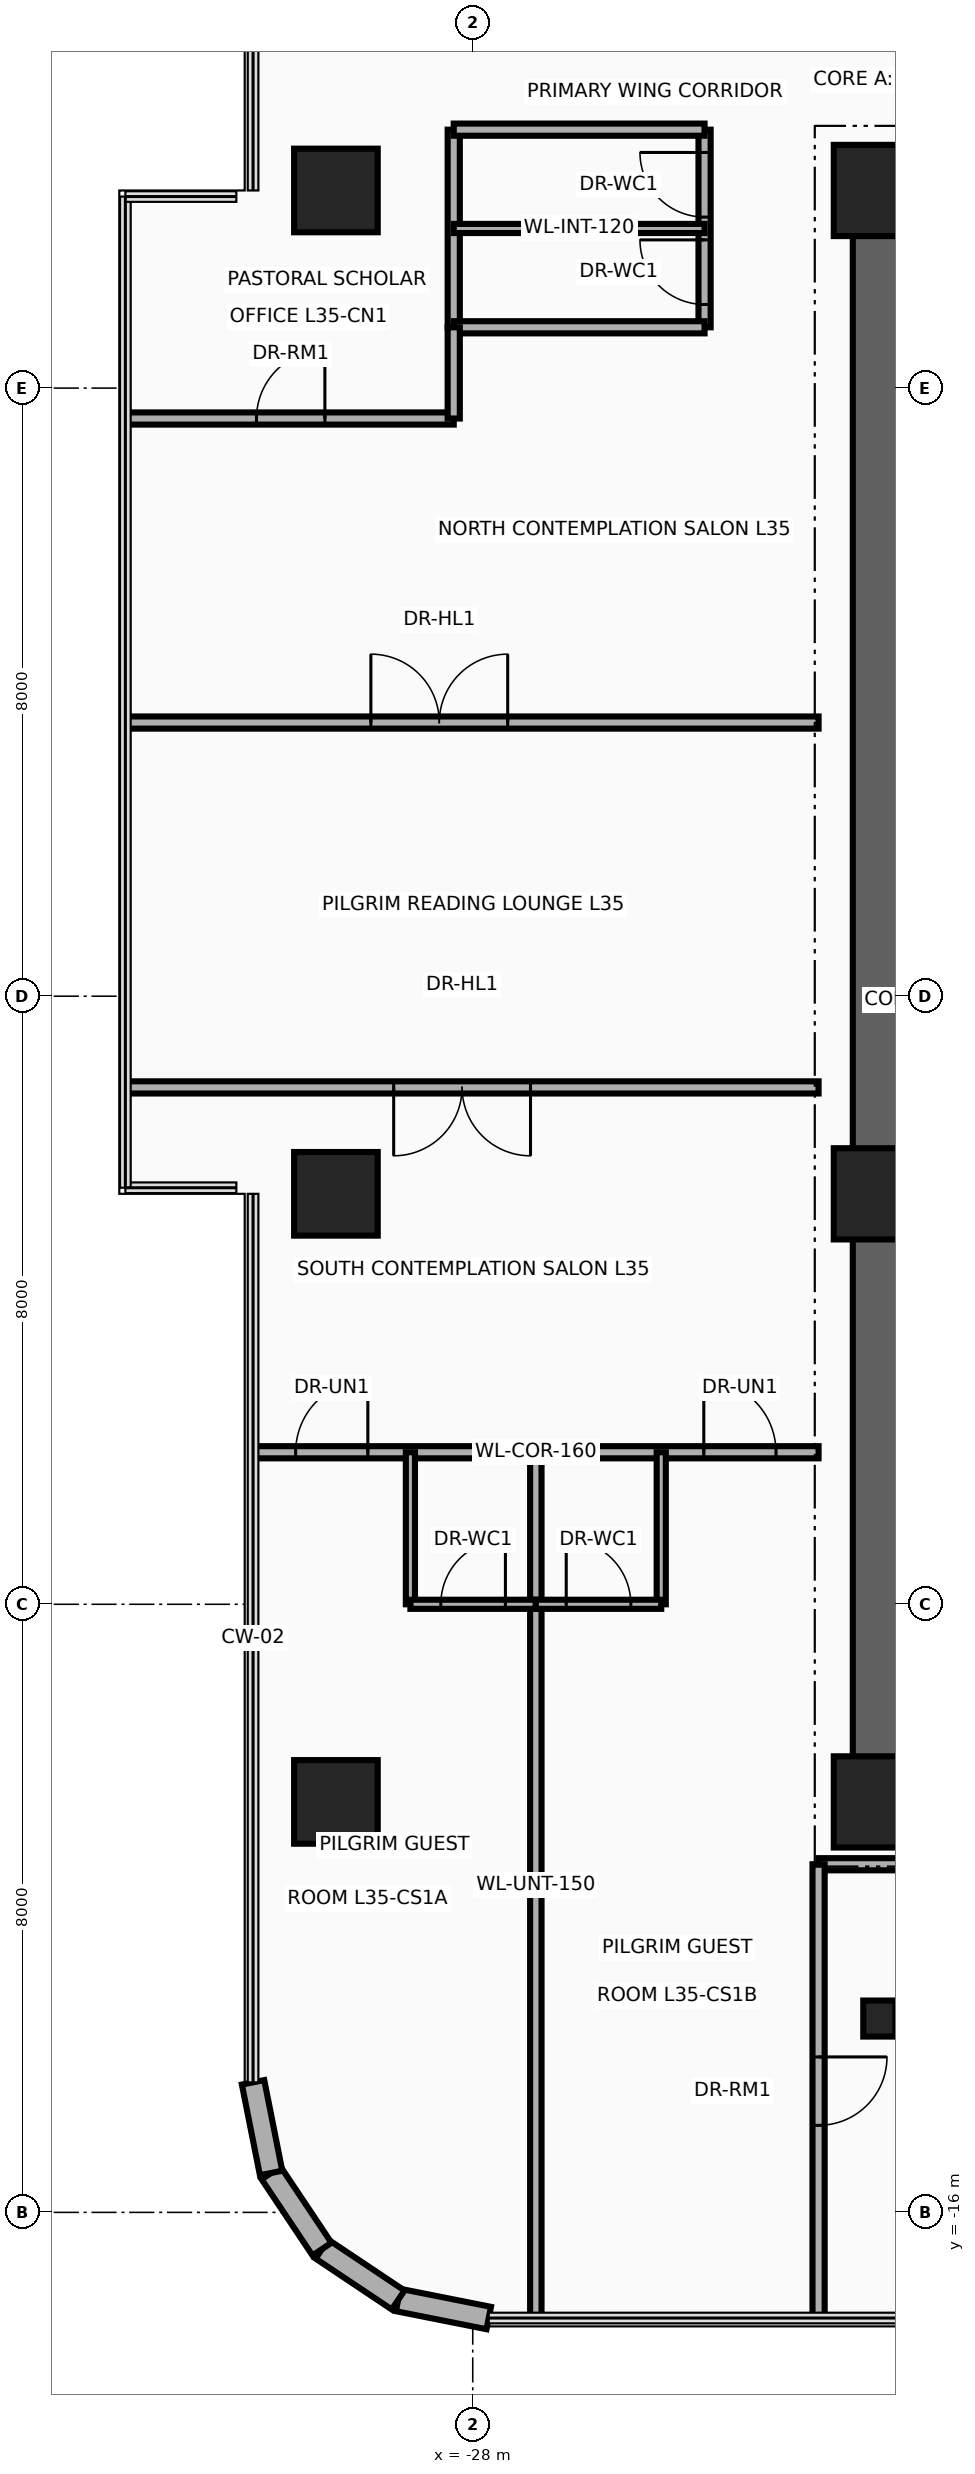
"""IFC4 building model, lengths in metres.
Left out: names, types, materials, properties, quantities, classifications, styles, units other than length and angle.
Written with IfcOpenShell. Run it as: python <this file> out.ifc"""

import sys

from ifc_helpers import new_model, si_unit, direction, frame, frame_2d, origin, origin_2d, place, context, subcontext, project, spatial, rectangle, circle, i_section, extrude, source, transform, mapped, element, fill, save


model = new_model("IFC4")
c1 = context("Model", 3, precision=1e-05, world=origin(), true_north=direction((0.0, 1.0)))
c2 = subcontext(c1, "Body", "Model", "MODEL_VIEW")
j1 = project(units=[si_unit("LENGTHUNIT", "METRE"), si_unit("PLANEANGLEUNIT", "RADIAN")], contexts=[c1])
p1 = place(None, origin())
s1 = spatial("IfcSite", under=j1, at=p1, CompositionType="ELEMENT")
p2 = place(p1, origin())
s2 = spatial("IfcBuilding", under=s1, at=p2, CompositionType="ELEMENT")
p3 = place(p2, frame((0.0, 0.0, 139.0)))
s3 = spatial("IfcBuildingStorey", under=s2, at=p3, CompositionType="ELEMENT", Elevation=139.0)
p4 = place(p3, frame((-22.65, -11.15, 0.0), z_axis=(0.0, 0.0, 1.0), x_axis=(0.0, 1.0, 0.0)))
e1 = element("IfcWall", 1, at=p4, inside=s3, PredefinedType="SHEAR", context=c2, shape_type="SweptSolid", body=[
    extrude(rectangle(XDim=22.3, YDim=0.7, at=frame_2d((11.15, 0.0))), origin(), (0.0, 0.0, 1.0), 3.46),
])
for number, where, z_axis, x_axis in (
    (2, (-22.65, 10.8, 0.0), (0.0, 0.0, 1.0), (1.0, 0.0, 0.0)),
    (3, (-22.65, -10.8, 0.0), (0.0, 0.0, 1.0), (1.0, 0.0, 0.0)),
):
    element("IfcWall", number, at=place(p3, frame(where, z_axis=z_axis, x_axis=x_axis)), inside=s3, PredefinedType="SHEAR", context=c2, shape_type="SweptSolid", body=[
        extrude(rectangle(XDim=10.25, YDim=0.7, at=frame_2d((5.125, 0.0))), origin(), (0.0, 0.0, 1.0), 3.46),
    ])
m1 = source(origin(), c2, "Body", "SweptSolid", [
    extrude(circle(Radius=0.55, at=origin_2d()), origin(), (0.0, 0.0, 1.0), 3.7),
])
p5 = place(p3, frame((-29.8, -10.6, 0.0), z_axis=(0.0, 0.0, 1.0), x_axis=(1.0, 0.0, 0.0)))
e4 = element("IfcColumn", 4, at=p5, inside=s3, PredefinedType="COLUMN", context=c2, shape_type="MappedRepresentation", body=[
    mapped(m1, transform((0.0, 0.0, 0.0), x_axis=(1.0, 0.0, 0.0), y_axis=(0.0, 1.0, 0.0), z_axis=(0.0, 0.0, 1.0), scale=1.0)),
])
m2 = source(origin(), c2, "Body", "SweptSolid", [
    extrude(rectangle(XDim=1.2, YDim=1.2, at=origin_2d()), origin(), (0.0, 0.0, 1.0), 3.7),
])
p6 = place(p3, frame((-22.65, -10.6, 0.0), z_axis=(0.0, 0.0, 1.0), x_axis=(1.0, 0.0, 0.0)))
e5 = element("IfcColumn", 5, at=p6, inside=s3, PredefinedType="COLUMN", context=c2, shape_type="MappedRepresentation", body=[
    mapped(m2, transform((0.0, 0.0, 0.0), x_axis=(1.0, 0.0, 0.0), y_axis=(0.0, 1.0, 0.0), z_axis=(0.0, 0.0, 1.0), scale=1.0)),
])
p7 = place(p3, frame((-29.8, -2.6, 0.0), z_axis=(0.0, 0.0, 1.0), x_axis=(1.0, 0.0, 0.0)))
e6 = element("IfcColumn", 6, at=p7, inside=s3, PredefinedType="COLUMN", context=c2, shape_type="MappedRepresentation", body=[
    mapped(m1, transform((0.0, 0.0, 0.0), x_axis=(1.0, 0.0, 0.0), y_axis=(0.0, 1.0, 0.0), z_axis=(0.0, 0.0, 1.0), scale=1.0)),
])
p8 = place(p3, frame((-22.65, -2.6, 0.0), z_axis=(0.0, 0.0, 1.0), x_axis=(1.0, 0.0, 0.0)))
e7 = element("IfcColumn", 7, at=p8, inside=s3, PredefinedType="COLUMN", context=c2, shape_type="MappedRepresentation", body=[
    mapped(m2, transform((0.0, 0.0, 0.0), x_axis=(1.0, 0.0, 0.0), y_axis=(0.0, 1.0, 0.0), z_axis=(0.0, 0.0, 1.0), scale=1.0)),
])
p9 = place(p3, frame((-29.8, 10.6, 0.0), z_axis=(0.0, 0.0, 1.0), x_axis=(1.0, 0.0, 0.0)))
e8 = element("IfcColumn", 8, at=p9, inside=s3, PredefinedType="COLUMN", context=c2, shape_type="MappedRepresentation", body=[
    mapped(m1, transform((0.0, 0.0, 0.0), x_axis=(1.0, 0.0, 0.0), y_axis=(0.0, 1.0, 0.0), z_axis=(0.0, 0.0, 1.0), scale=1.0)),
])
p10 = place(p3, frame((-22.65, 10.6, 0.0), z_axis=(0.0, 0.0, 1.0), x_axis=(1.0, 0.0, 0.0)))
e9 = element("IfcColumn", 9, at=p10, inside=s3, PredefinedType="COLUMN", context=c2, shape_type="MappedRepresentation", body=[
    mapped(m2, transform((0.0, 0.0, 0.0), x_axis=(1.0, 0.0, 0.0), y_axis=(0.0, 1.0, 0.0), z_axis=(0.0, 0.0, 1.0), scale=1.0)),
])
m3 = source(origin(), c2, "Body", "SweptSolid", [
    extrude(i_section(OverallWidth=0.424, OverallDepth=0.474, WebThickness=0.048, FlangeThickness=0.077, at=origin_2d()), origin(), (0.0, 0.0, 1.0), 3.7),
])
p11 = place(p3, frame((-22.65, -13.45, 0.0), z_axis=(0.0, 0.0, 1.0), x_axis=(1.0, 0.0, 0.0)))
e10 = element("IfcColumn", 10, at=p11, inside=s3, PredefinedType="COLUMN", context=c2, shape_type="MappedRepresentation", body=[
    mapped(m3, transform((0.0, 0.0, 0.0), x_axis=(1.0, 0.0, 0.0), y_axis=(0.0, 1.0, 0.0), z_axis=(0.0, 0.0, 1.0), scale=1.0)),
])
p12 = place(p3, frame((-27.789, -17.39, 0.0), z_axis=(0.0, 0.0, 1.0), x_axis=(-0.980804027463, 0.194996050505, 0.0)))
e11 = element("IfcWall", 11, at=p12, inside=s3, PredefinedType="SOLIDWALL", context=c2, shape_type="SweptSolid", body=[
    extrude(rectangle(XDim=1.216, YDim=0.3, at=frame_2d((0.608, 0.0))), origin(), (0.0, 0.0, 1.0), 3.46),
])
for number, where, z_axis, x_axis in (
    (12, (-28.982, -17.153, 0.0), (0.0, 0.0, 1.0), (-0.831, 0.556, 0.0)),
    (13, (-29.983, -16.483, 0.0), (0.0, 0.0, 1.0), (-0.556, 0.831, 0.0)),
):
    element("IfcWall", number, at=place(p3, frame(where, z_axis=z_axis, x_axis=x_axis)), inside=s3, PredefinedType="SOLIDWALL", context=c2, shape_type="SweptSolid", body=[
        extrude(rectangle(XDim=1.205, YDim=0.3, at=frame_2d((0.603, 0.0))), origin(), (0.0, 0.0, 1.0), 3.46),
    ])
p13 = place(p3, frame((-30.653, -15.482, 0.0), z_axis=(0.0, 0.0, 1.0), x_axis=(-0.194996050505, 0.980804027463, 0.0)))
e14 = element("IfcWall", 14, at=p13, inside=s3, PredefinedType="SOLIDWALL", context=c2, shape_type="SweptSolid", body=[
    extrude(rectangle(XDim=1.216, YDim=0.3, at=frame_2d((0.608, 0.0))), origin(), (0.0, 0.0, 1.0), 3.46),
])
p14 = place(p3, frame((-28.25, 8.8, 0.0), z_axis=(0.0, 0.0, 1.0), x_axis=(0.0, 1.0, 0.0)))
e15 = element("IfcWall", 15, at=p14, inside=s3, PredefinedType="PARTITIONING", context=c2, shape_type="SweptSolid", body=[
    extrude(rectangle(XDim=2.6, YDim=0.16, at=frame_2d((1.3, 0.0))), origin(), (0.0, 0.0, 1.0), 2.666),
])
p15 = place(p3, frame((-24.95, 8.8, 0.0), z_axis=(0.0, 0.0, 1.0), x_axis=(0.0, 1.0, 0.0)))
e16 = element("IfcWall", 16, at=p15, inside=s3, PredefinedType="PARTITIONING", context=c2, shape_type="SweptSolid", body=[
    extrude(rectangle(XDim=2.6, YDim=0.16, at=frame_2d((1.3, 0.0))), origin(), (0.0, 0.0, 1.0), 2.666),
])
p16 = place(p15, frame((0.3, 0.0, 0.0)))
e17 = element("IfcOpeningElement", 17, at=p16, cuts=e16, PredefinedType="OPENING", context=c2, shape_type="SweptSolid", body=[
    extrude(rectangle(XDim=0.85, YDim=2.1, at=frame_2d((0.425, 1.05))), frame((0.0, 0.095, 0.0), z_axis=(0.0, -1.0, 0.0), x_axis=(1.0, 0.0, 0.0)), (0.0, 0.0, 1.0), 0.19),
])
p17 = place(p15, frame((1.45, 0.0, 0.0)))
e18 = element("IfcOpeningElement", 18, at=p17, cuts=e16, PredefinedType="OPENING", context=c2, shape_type="SweptSolid", body=[
    extrude(rectangle(XDim=0.85, YDim=2.1, at=frame_2d((0.425, 1.05))), frame((0.0, 0.095, 0.0), z_axis=(0.0, -1.0, 0.0), x_axis=(1.0, 0.0, 0.0)), (0.0, 0.0, 1.0), 0.19),
])
for number, where, z_axis, x_axis in (
    (19, (-28.25, 8.8, 0.0), (0.0, 0.0, 1.0), (1.0, 0.0, 0.0)),
    (20, (-28.25, 11.4, 0.0), (0.0, 0.0, 1.0), (1.0, 0.0, 0.0)),
):
    element("IfcWall", number, at=place(p3, frame(where, z_axis=z_axis, x_axis=x_axis)), inside=s3, PredefinedType="PARTITIONING", context=c2, shape_type="SweptSolid", body=[
        extrude(rectangle(XDim=3.3, YDim=0.16, at=frame_2d((1.65, 0.0))), origin(), (0.0, 0.0, 1.0), 3.46),
    ])
p18 = place(p3, frame((-28.25, 10.1, 0.0), z_axis=(0.0, 0.0, 1.0), x_axis=(1.0, 0.0, 0.0)))
e21 = element("IfcWall", 21, at=p18, inside=s3, PredefinedType="PARTITIONING", context=c2, shape_type="SweptSolid", body=[
    extrude(rectangle(XDim=3.3, YDim=0.12, at=frame_2d((1.65, 0.0))), origin(), (0.0, 0.0, 1.0), 3.46),
])
p19 = place(p3, frame((-23.45, -11.42, 0.0), z_axis=(0.0, 0.0, 1.0), x_axis=(1.0, 0.0, 0.0)))
e22 = element("IfcWall", 22, at=p19, inside=s3, PredefinedType="PARTITIONING", context=c2, shape_type="SweptSolid", body=[
    extrude(rectangle(XDim=13.84, YDim=0.16, at=frame_2d((6.92, 0.0))), origin(), (0.0, 0.0, 1.0), 2.834),
])
p20 = place(p3, frame((-23.45, -17.39, 0.0), z_axis=(0.0, 0.0, 1.0), x_axis=(0.0, 1.0, 0.0)))
e23 = element("IfcWall", 23, at=p20, inside=s3, PredefinedType="PARTITIONING", context=c2, shape_type="SweptSolid", body=[
    extrude(rectangle(XDim=5.97, YDim=0.16, at=frame_2d((2.985, 0.0))), origin(), (0.0, 0.0, 1.0), 3.46),
])
p21 = place(p20, frame((2.535, 0.0, 0.0)))
e24 = element("IfcOpeningElement", 24, at=p21, cuts=e23, PredefinedType="OPENING", context=c2, shape_type="SweptSolid", body=[
    extrude(rectangle(XDim=0.9, YDim=2.1, at=frame_2d((0.45, 1.05))), frame((0.0, 0.095, 0.0), z_axis=(0.0, -1.0, 0.0), x_axis=(1.0, 0.0, 0.0)), (0.0, 0.0, 1.0), 0.19),
])
p22 = place(p3, frame((-30.89, -6.0, 0.0), z_axis=(0.0, 0.0, 1.0), x_axis=(1.0, 0.0, 0.0)))
e25 = element("IfcWall", 25, at=p22, inside=s3, PredefinedType="PARTITIONING", context=c2, shape_type="SweptSolid", body=[
    extrude(rectangle(XDim=7.44, YDim=0.16, at=frame_2d((3.72, 0.0))), origin(), (0.0, 0.0, 1.0), 2.896),
])
p23 = place(p22, frame((0.56, 0.0, 0.0)))
e26 = element("IfcOpeningElement", 26, at=p23, cuts=e25, PredefinedType="OPENING", context=c2, shape_type="SweptSolid", body=[
    extrude(rectangle(XDim=0.95, YDim=2.15, at=frame_2d((0.475, 1.075))), frame((0.0, 0.095, 0.0), z_axis=(0.0, -1.0, 0.0), x_axis=(1.0, 0.0, 0.0)), (0.0, 0.0, 1.0), 0.19),
])
p24 = place(p22, frame((5.93, 0.0, 0.0)))
e27 = element("IfcOpeningElement", 27, at=p24, cuts=e25, PredefinedType="OPENING", context=c2, shape_type="SweptSolid", body=[
    extrude(rectangle(XDim=0.95, YDim=2.15, at=frame_2d((0.475, 1.075))), frame((0.0, 0.095, 0.0), z_axis=(0.0, -1.0, 0.0), x_axis=(1.0, 0.0, 0.0)), (0.0, 0.0, 1.0), 0.19),
])
p25 = place(p3, frame((-32.54, 7.6, 0.0), z_axis=(0.0, 0.0, 1.0), x_axis=(1.0, 0.0, 0.0)))
e28 = element("IfcWall", 28, at=p25, inside=s3, PredefinedType="PARTITIONING", context=c2, shape_type="SweptSolid", body=[
    extrude(rectangle(XDim=4.29, YDim=0.16, at=frame_2d((2.145, 0.0))), origin(), (0.0, 0.0, 1.0), 2.896),
])
p26 = place(p25, frame((1.695, 0.0, 0.0)))
e29 = element("IfcOpeningElement", 29, at=p26, cuts=e28, PredefinedType="OPENING", context=c2, shape_type="SweptSolid", body=[
    extrude(rectangle(XDim=0.9, YDim=2.1, at=frame_2d((0.45, 1.05))), frame((0.0, 0.095, 0.0), z_axis=(0.0, -1.0, 0.0), x_axis=(1.0, 0.0, 0.0)), (0.0, 0.0, 1.0), 0.19),
])
p27 = place(p3, frame((-28.25, 7.6, 0.0), z_axis=(0.0, 0.0, 1.0), x_axis=(0.0, 1.0, 0.0)))
e30 = element("IfcWall", 30, at=p27, inside=s3, PredefinedType="PARTITIONING", context=c2, shape_type="SweptSolid", body=[
    extrude(rectangle(XDim=1.2, YDim=0.16, at=frame_2d((0.6, 0.0))), origin(), (0.0, 0.0, 1.0), 2.988),
])
p28 = place(p3, frame((-27.17, -17.39, 0.0), z_axis=(0.0, 0.0, 1.0), x_axis=(0.0, 1.0, 0.0)))
e31 = element("IfcWall", 31, at=p28, inside=s3, PredefinedType="PARTITIONING", context=c2, shape_type="SweptSolid", body=[
    extrude(rectangle(XDim=11.39, YDim=0.15, at=frame_2d((5.695, 0.0))), origin(), (0.0, 0.0, 1.0), 2.666),
])
p29 = place(p3, frame((-28.82, -8.0, 0.0), z_axis=(0.0, 0.0, 1.0), x_axis=(0.0, 1.0, 0.0)))
e32 = element("IfcWall", 32, at=p29, inside=s3, PredefinedType="PARTITIONING", context=c2, shape_type="SweptSolid", body=[
    extrude(rectangle(XDim=2.0, YDim=0.12, at=frame_2d((1.0, 0.0))), origin(), (0.0, 0.0, 1.0), 2.988),
])
p30 = place(p3, frame((-28.82, -8.0, 0.0), z_axis=(0.0, 0.0, 1.0), x_axis=(1.0, 0.0, 0.0)))
e33 = element("IfcWall", 33, at=p30, inside=s3, PredefinedType="PARTITIONING", context=c2, shape_type="SweptSolid", body=[
    extrude(rectangle(XDim=1.65, YDim=0.12, at=frame_2d((0.825, 0.0))), origin(), (0.0, 0.0, 1.0), 3.46),
])
p31 = place(p30, frame((0.4, 0.0, 0.0)))
e34 = element("IfcOpeningElement", 34, at=p31, cuts=e33, PredefinedType="OPENING", context=c2, shape_type="SweptSolid", body=[
    extrude(rectangle(XDim=0.85, YDim=2.1, at=frame_2d((0.425, 1.05))), frame((0.0, 0.075, 0.0), z_axis=(0.0, -1.0, 0.0), x_axis=(1.0, 0.0, 0.0)), (0.0, 0.0, 1.0), 0.15),
])
p32 = place(p3, frame((-25.52, -8.0, 0.0), z_axis=(0.0, 0.0, 1.0), x_axis=(0.0, 1.0, 0.0)))
e35 = element("IfcWall", 35, at=p32, inside=s3, PredefinedType="PARTITIONING", context=c2, shape_type="SweptSolid", body=[
    extrude(rectangle(XDim=2.0, YDim=0.12, at=frame_2d((1.0, 0.0))), origin(), (0.0, 0.0, 1.0), 2.988),
])
p33 = place(p3, frame((-27.17, -8.0, 0.0), z_axis=(0.0, 0.0, 1.0), x_axis=(1.0, 0.0, 0.0)))
e36 = element("IfcWall", 36, at=p33, inside=s3, PredefinedType="PARTITIONING", context=c2, shape_type="SweptSolid", body=[
    extrude(rectangle(XDim=1.65, YDim=0.12, at=frame_2d((0.825, 0.0))), origin(), (0.0, 0.0, 1.0), 3.46),
])
p34 = place(p33, frame((0.4, 0.0, 0.0)))
e37 = element("IfcOpeningElement", 37, at=p34, cuts=e36, PredefinedType="OPENING", context=c2, shape_type="SweptSolid", body=[
    extrude(rectangle(XDim=0.85, YDim=2.1, at=frame_2d((0.425, 1.05))), frame((0.0, 0.075, 0.0), z_axis=(0.0, -1.0, 0.0), x_axis=(1.0, 0.0, 0.0)), (0.0, 0.0, 1.0), 0.15),
])
p35 = place(p3, frame((-32.54, -1.2, 0.0), z_axis=(0.0, 0.0, 1.0), x_axis=(1.0, 0.0, 0.0)))
e38 = element("IfcWall", 38, at=p35, inside=s3, PredefinedType="PARTITIONING", context=c2, shape_type="SweptSolid", body=[
    extrude(rectangle(XDim=9.09, YDim=0.16, at=frame_2d((4.545, 0.0))), origin(), (0.0, 0.0, 1.0), 2.896),
])
p36 = place(p35, frame((3.5, 0.0, 0.0)))
e39 = element("IfcOpeningElement", 39, at=p36, cuts=e38, PredefinedType="OPENING", context=c2, shape_type="SweptSolid", body=[
    extrude(rectangle(XDim=1.8, YDim=2.15, at=frame_2d((0.9, 1.075))), frame((0.0, 0.095, 0.0), z_axis=(0.0, -1.0, 0.0), x_axis=(1.0, 0.0, 0.0)), (0.0, 0.0, 1.0), 0.19),
])
p37 = place(p3, frame((-32.54, 3.6, 0.0), z_axis=(0.0, 0.0, 1.0), x_axis=(1.0, 0.0, 0.0)))
e40 = element("IfcWall", 40, at=p37, inside=s3, PredefinedType="PARTITIONING", context=c2, shape_type="SweptSolid", body=[
    extrude(rectangle(XDim=9.09, YDim=0.16, at=frame_2d((4.545, 0.0))), origin(), (0.0, 0.0, 1.0), 2.896),
])
p38 = place(p37, frame((3.2, 0.0, 0.0)))
e41 = element("IfcOpeningElement", 41, at=p38, cuts=e40, PredefinedType="OPENING", context=c2, shape_type="SweptSolid", body=[
    extrude(rectangle(XDim=1.8, YDim=2.15, at=frame_2d((0.9, 1.075))), frame((0.0, 0.095, 0.0), z_axis=(0.0, -1.0, 0.0), x_axis=(1.0, 0.0, 0.0)), (0.0, 0.0, 1.0), 0.19),
])
p39 = place(p16, origin())
e42 = element("IfcDoor", 42, at=p39, inside=s3, OperationType="SINGLE_SWING_RIGHT", PredefinedType="DOOR", context=c2, shape_type="SweptSolid", body=[
    extrude(rectangle(XDim=0.85, YDim=2.1, at=frame_2d((0.425, 1.05))), frame((0.0, 0.025, 0.0), z_axis=(0.0, -1.0, 0.0), x_axis=(1.0, 0.0, 0.0)), (0.0, 0.0, 1.0), 0.05),
])
fill(e17, e42)
p40 = place(p17, origin())
e43 = element("IfcDoor", 43, at=p40, inside=s3, OperationType="SINGLE_SWING_LEFT", PredefinedType="DOOR", context=c2, shape_type="SweptSolid", body=[
    extrude(rectangle(XDim=0.85, YDim=2.1, at=frame_2d((0.425, 1.05))), frame((0.0, 0.025, 0.0), z_axis=(0.0, -1.0, 0.0), x_axis=(1.0, 0.0, 0.0)), (0.0, 0.0, 1.0), 0.05),
])
fill(e18, e43)
p41 = place(p23, origin())
e44 = element("IfcDoor", 44, at=p41, inside=s3, OperationType="SINGLE_SWING_RIGHT", PredefinedType="DOOR", context=c2, shape_type="SweptSolid", body=[
    extrude(rectangle(XDim=0.95, YDim=2.15, at=frame_2d((0.475, 1.075))), frame((0.0, 0.025, 0.0), z_axis=(0.0, -1.0, 0.0), x_axis=(1.0, 0.0, 0.0)), (0.0, 0.0, 1.0), 0.05),
])
fill(e26, e44)
p42 = place(p31, origin())
e45 = element("IfcDoor", 45, at=p42, inside=s3, OperationType="SINGLE_SWING_LEFT", PredefinedType="DOOR", context=c2, shape_type="SweptSolid", body=[
    extrude(rectangle(XDim=0.85, YDim=2.1, at=frame_2d((0.425, 1.05))), frame((0.0, 0.025, 0.0), z_axis=(0.0, -1.0, 0.0), x_axis=(1.0, 0.0, 0.0)), (0.0, 0.0, 1.0), 0.05),
])
fill(e34, e45)
p43 = place(p24, origin())
e46 = element("IfcDoor", 46, at=p43, inside=s3, OperationType="SINGLE_SWING_RIGHT", PredefinedType="DOOR", context=c2, shape_type="SweptSolid", body=[
    extrude(rectangle(XDim=0.95, YDim=2.15, at=frame_2d((0.475, 1.075))), frame((0.0, 0.025, 0.0), z_axis=(0.0, -1.0, 0.0), x_axis=(1.0, 0.0, 0.0)), (0.0, 0.0, 1.0), 0.05),
])
fill(e27, e46)
p44 = place(p34, origin())
e47 = element("IfcDoor", 47, at=p44, inside=s3, OperationType="SINGLE_SWING_LEFT", PredefinedType="DOOR", context=c2, shape_type="SweptSolid", body=[
    extrude(rectangle(XDim=0.85, YDim=2.1, at=frame_2d((0.425, 1.05))), frame((0.0, 0.025, 0.0), z_axis=(0.0, -1.0, 0.0), x_axis=(1.0, 0.0, 0.0)), (0.0, 0.0, 1.0), 0.05),
])
fill(e37, e47)
p45 = place(p26, origin())
e48 = element("IfcDoor", 48, at=p45, inside=s3, OperationType="SINGLE_SWING_RIGHT", PredefinedType="DOOR", context=c2, shape_type="SweptSolid", body=[
    extrude(rectangle(XDim=0.9, YDim=2.1, at=frame_2d((0.45, 1.05))), frame((0.0, 0.025, 0.0), z_axis=(0.0, -1.0, 0.0), x_axis=(1.0, 0.0, 0.0)), (0.0, 0.0, 1.0), 0.05),
])
fill(e29, e48)
p46 = place(p36, frame((1.8, 0.0, 0.0), z_axis=(0.0, 0.0, 1.0), x_axis=(-1.0, 0.0, 0.0)))
e49 = element("IfcDoor", 49, at=p46, inside=s3, OperationType="DOUBLE_DOOR_SINGLE_SWING", PredefinedType="DOOR", context=c2, shape_type="SweptSolid", body=[
    extrude(rectangle(XDim=1.8, YDim=2.15, at=frame_2d((0.9, 1.075))), frame((0.0, 0.025, 0.0), z_axis=(0.0, -1.0, 0.0), x_axis=(1.0, 0.0, 0.0)), (0.0, 0.0, 1.0), 0.05),
])
fill(e39, e49)
p47 = place(p38, origin())
e50 = element("IfcDoor", 50, at=p47, inside=s3, OperationType="DOUBLE_DOOR_SINGLE_SWING", PredefinedType="DOOR", context=c2, shape_type="SweptSolid", body=[
    extrude(rectangle(XDim=1.8, YDim=2.15, at=frame_2d((0.9, 1.075))), frame((0.0, 0.025, 0.0), z_axis=(0.0, -1.0, 0.0), x_axis=(1.0, 0.0, 0.0)), (0.0, 0.0, 1.0), 0.05),
])
fill(e41, e50)
p48 = place(p21, frame((0.9, 0.0, 0.0), z_axis=(0.0, 0.0, 1.0), x_axis=(-1.0, 0.0, 0.0)))
e51 = element("IfcDoor", 51, at=p48, inside=s3, OperationType="SINGLE_SWING_LEFT", PredefinedType="DOOR", context=c2, shape_type="SweptSolid", body=[
    extrude(rectangle(XDim=0.9, YDim=2.1, at=frame_2d((0.45, 1.05))), frame((0.0, 0.025, 0.0), z_axis=(0.0, -1.0, 0.0), x_axis=(1.0, 0.0, 0.0)), (0.0, 0.0, 1.0), 0.05),
])
fill(e24, e51)
save(model, sys.argv[1])
